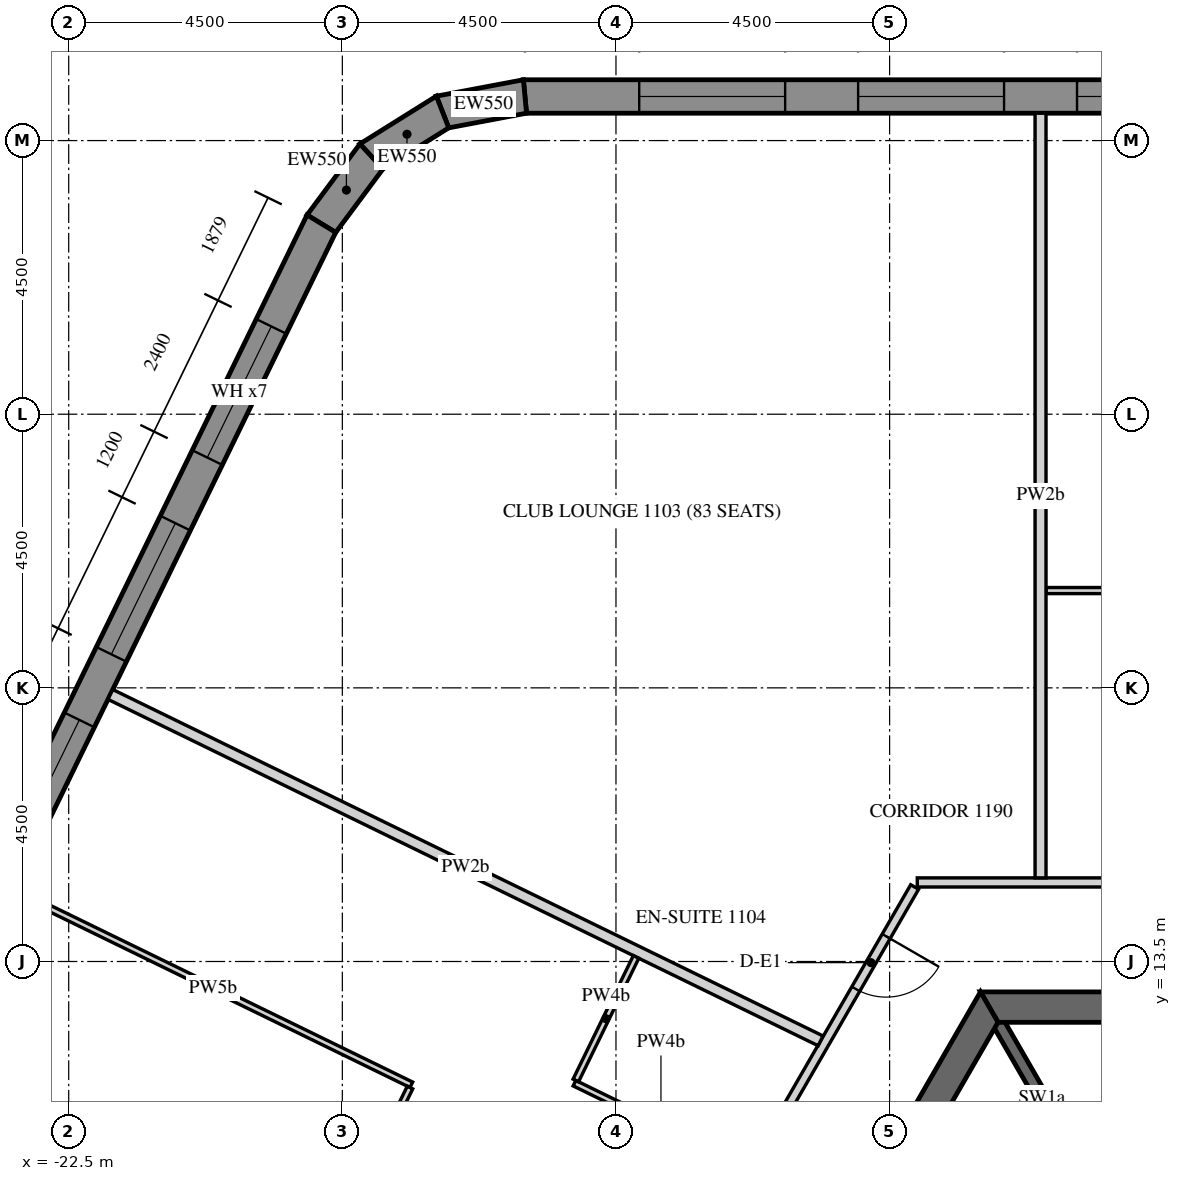
"""IFC4 building model, lengths in metres.
Left out: names, types, materials, properties, quantities, classifications, styles, units other than length and angle.
Written with IfcOpenShell. Run it as: python <this file> out.ifc"""

import sys

from ifc_helpers import new_model, si_unit, direction, frame, frame_2d, origin, place, context, subcontext, project, spatial, polyline, rectangle, outline, extrude, element, fill, save


model = new_model("IFC4")
c1 = context("Model", 3, precision=1e-05, world=origin(), true_north=direction((0.0, 1.0)))
c2 = subcontext(c1, "Body", "Model", "MODEL_VIEW")
j1 = project(units=[si_unit("LENGTHUNIT", "METRE"), si_unit("PLANEANGLEUNIT", "RADIAN")], contexts=[c1])
p1 = place(None, origin())
s1 = spatial("IfcSite", under=j1, at=p1, CompositionType="ELEMENT")
p2 = place(p1, origin())
s2 = spatial("IfcBuilding", under=s1, at=p2, CompositionType="ELEMENT")
p3 = place(p2, frame((0.0, 0.0, 156.6)))
s3 = spatial("IfcBuildingStorey", under=s2, at=p3, CompositionType="ELEMENT", Elevation=156.6)
p4 = place(p3, frame((12.761, 27.725, -0.15), z_axis=(0.0, 0.0, 1.0), x_axis=(-1.0, 0.0, 0.0)))
e1 = element("IfcWall", 1, at=p4, inside=s3, PredefinedType="SOLIDWALL", context=c2, shape_type="SweptSolid", body=[
    extrude(outline(polyline([(-0.022, -0.275), (27.783, -0.275), (27.732, 0.275), (0.022, 0.275), (-0.022, -0.275)])), origin(), (0.0, 0.0, 1.0), 3.9),
])
p5 = place(p4, frame((1.879, 0.0, 1.05)))
e2 = element("IfcOpeningElement", 2, at=p5, cuts=e1, PredefinedType="OPENING", context=c2, shape_type="SweptSolid", body=[
    extrude(rectangle(XDim=2.4, YDim=2.4, at=frame_2d((1.2, 1.2))), frame((0.0, 0.285, 0.0), z_axis=(0.0, -1.0, 0.0), x_axis=(1.0, 0.0, 0.0)), (0.0, 0.0, 1.0), 0.57),
])
p6 = place(p4, frame((5.479, 0.0, 1.05)))
e3 = element("IfcOpeningElement", 3, at=p6, cuts=e1, PredefinedType="OPENING", context=c2, shape_type="SweptSolid", body=[
    extrude(rectangle(XDim=2.4, YDim=2.4, at=frame_2d((1.2, 1.2))), frame((0.0, 0.285, 0.0), z_axis=(0.0, -1.0, 0.0), x_axis=(1.0, 0.0, 0.0)), (0.0, 0.0, 1.0), 0.57),
])
p7 = place(p4, frame((9.079, 0.0, 1.05)))
e4 = element("IfcOpeningElement", 4, at=p7, cuts=e1, PredefinedType="OPENING", context=c2, shape_type="SweptSolid", body=[
    extrude(rectangle(XDim=2.4, YDim=2.4, at=frame_2d((1.2, 1.2))), frame((0.0, 0.285, 0.0), z_axis=(0.0, -1.0, 0.0), x_axis=(1.0, 0.0, 0.0)), (0.0, 0.0, 1.0), 0.57),
])
p8 = place(p4, frame((12.679, 0.0, 1.05)))
e5 = element("IfcOpeningElement", 5, at=p8, cuts=e1, PredefinedType="OPENING", context=c2, shape_type="SweptSolid", body=[
    extrude(rectangle(XDim=2.4, YDim=2.4, at=frame_2d((1.2, 1.2))), frame((0.0, 0.285, 0.0), z_axis=(0.0, -1.0, 0.0), x_axis=(1.0, 0.0, 0.0)), (0.0, 0.0, 1.0), 0.57),
])
p9 = place(p4, frame((16.279, 0.0, 1.05)))
e6 = element("IfcOpeningElement", 6, at=p9, cuts=e1, PredefinedType="OPENING", context=c2, shape_type="SweptSolid", body=[
    extrude(rectangle(XDim=2.4, YDim=2.4, at=frame_2d((1.2, 1.2))), frame((0.0, 0.285, 0.0), z_axis=(0.0, -1.0, 0.0), x_axis=(1.0, 0.0, 0.0)), (0.0, 0.0, 1.0), 0.57),
])
p10 = place(p4, frame((19.879, 0.0, 1.05)))
e7 = element("IfcOpeningElement", 7, at=p10, cuts=e1, PredefinedType="OPENING", context=c2, shape_type="SweptSolid", body=[
    extrude(rectangle(XDim=2.4, YDim=2.4, at=frame_2d((1.2, 1.2))), frame((0.0, 0.285, 0.0), z_axis=(0.0, -1.0, 0.0), x_axis=(1.0, 0.0, 0.0)), (0.0, 0.0, 1.0), 0.57),
])
p11 = place(p4, frame((23.479, 0.0, 1.05)))
e8 = element("IfcOpeningElement", 8, at=p11, cuts=e1, PredefinedType="OPENING", context=c2, shape_type="SweptSolid", body=[
    extrude(rectangle(XDim=2.4, YDim=2.4, at=frame_2d((1.2, 1.2))), frame((0.0, 0.285, 0.0), z_axis=(0.0, -1.0, 0.0), x_axis=(1.0, 0.0, 0.0)), (0.0, 0.0, 1.0), 0.57),
])
p12 = place(p3, frame((-14.997, 27.725, -0.15), z_axis=(0.0, 0.0, 1.0), x_axis=(-0.982705443133, -0.185175624845, 0.0)))
e9 = element("IfcWall", 9, at=p12, inside=s3, PredefinedType="SOLIDWALL", context=c2, shape_type="SweptSolid", body=[
    extrude(outline(polyline([(-0.026, -0.275), (1.431, -0.275), (1.327, 0.275), (0.026, 0.275), (-0.026, -0.275)])), origin(), (0.0, 0.0, 1.0), 3.9),
])
p13 = place(p3, frame((-16.352, 27.47, -0.15), z_axis=(0.0, 0.0, 1.0), x_axis=(-0.848057977594, -0.5299034503, 0.0)))
e10 = element("IfcWall", 10, at=p13, inside=s3, PredefinedType="SOLIDWALL", context=c2, shape_type="SweptSolid", body=[
    extrude(outline(polyline([(-0.052, -0.275), (1.431, -0.275), (1.327, 0.275), (0.052, 0.275), (-0.052, -0.275)])), origin(), (0.0, 0.0, 1.0), 3.9),
])
p14 = place(p3, frame((-17.521, 26.739, -0.15), z_axis=(0.0, 0.0, 1.0), x_axis=(-0.597135295884, -0.802140535324, 0.0)))
e11 = element("IfcWall", 11, at=p14, inside=s3, PredefinedType="SOLIDWALL", context=c2, shape_type="SweptSolid", body=[
    extrude(outline(polyline([(-0.052, -0.275), (1.405, -0.275), (1.354, 0.275), (0.052, 0.275), (-0.052, -0.275)])), origin(), (0.0, 0.0, 1.0), 3.9),
])
p15 = place(p3, frame((-18.345, 25.633, -0.15), z_axis=(0.0, 0.0, 1.0), x_axis=(-0.43837181828, -0.898793718791, 0.0)))
e12 = element("IfcWall", 12, at=p15, inside=s3, PredefinedType="SOLIDWALL", context=c2, shape_type="SweptSolid", body=[
    extrude(outline(polyline([(-0.026, -0.275), (27.78, -0.275), (27.735, 0.275), (0.026, 0.275), (-0.026, -0.275)])), origin(), (0.0, 0.0, 1.0), 3.9),
])
p16 = place(p15, frame((1.879, 0.0, 1.05)))
e13 = element("IfcOpeningElement", 13, at=p16, cuts=e12, PredefinedType="OPENING", context=c2, shape_type="SweptSolid", body=[
    extrude(rectangle(XDim=2.4, YDim=2.4, at=frame_2d((1.2, 1.2))), frame((0.0, 0.285, 0.0), z_axis=(0.0, -1.0, 0.0), x_axis=(1.0, 0.0, 0.0)), (0.0, 0.0, 1.0), 0.57),
])
p17 = place(p15, frame((5.479, 0.0, 1.05)))
e14 = element("IfcOpeningElement", 14, at=p17, cuts=e12, PredefinedType="OPENING", context=c2, shape_type="SweptSolid", body=[
    extrude(rectangle(XDim=2.4, YDim=2.4, at=frame_2d((1.2, 1.2))), frame((0.0, 0.285, 0.0), z_axis=(0.0, -1.0, 0.0), x_axis=(1.0, 0.0, 0.0)), (0.0, 0.0, 1.0), 0.57),
])
p18 = place(p15, frame((9.079, 0.0, 1.05)))
e15 = element("IfcOpeningElement", 15, at=p18, cuts=e12, PredefinedType="OPENING", context=c2, shape_type="SweptSolid", body=[
    extrude(rectangle(XDim=2.4, YDim=2.4, at=frame_2d((1.2, 1.2))), frame((0.0, 0.285, 0.0), z_axis=(0.0, -1.0, 0.0), x_axis=(1.0, 0.0, 0.0)), (0.0, 0.0, 1.0), 0.57),
])
p19 = place(p15, frame((12.679, 0.0, 1.05)))
e16 = element("IfcOpeningElement", 16, at=p19, cuts=e12, PredefinedType="OPENING", context=c2, shape_type="SweptSolid", body=[
    extrude(rectangle(XDim=2.4, YDim=2.4, at=frame_2d((1.2, 1.2))), frame((0.0, 0.285, 0.0), z_axis=(0.0, -1.0, 0.0), x_axis=(1.0, 0.0, 0.0)), (0.0, 0.0, 1.0), 0.57),
])
p20 = place(p15, frame((16.279, 0.0, 1.05)))
e17 = element("IfcOpeningElement", 17, at=p20, cuts=e12, PredefinedType="OPENING", context=c2, shape_type="SweptSolid", body=[
    extrude(rectangle(XDim=2.4, YDim=2.4, at=frame_2d((1.2, 1.2))), frame((0.0, 0.285, 0.0), z_axis=(0.0, -1.0, 0.0), x_axis=(1.0, 0.0, 0.0)), (0.0, 0.0, 1.0), 0.57),
])
p21 = place(p15, frame((19.879, 0.0, 1.05)))
e18 = element("IfcOpeningElement", 18, at=p21, cuts=e12, PredefinedType="OPENING", context=c2, shape_type="SweptSolid", body=[
    extrude(rectangle(XDim=2.4, YDim=2.4, at=frame_2d((1.2, 1.2))), frame((0.0, 0.285, 0.0), z_axis=(0.0, -1.0, 0.0), x_axis=(1.0, 0.0, 0.0)), (0.0, 0.0, 1.0), 0.57),
])
p22 = place(p15, frame((23.479, 0.0, 1.05)))
e19 = element("IfcOpeningElement", 19, at=p22, cuts=e12, PredefinedType="OPENING", context=c2, shape_type="SweptSolid", body=[
    extrude(rectangle(XDim=2.4, YDim=2.4, at=frame_2d((1.2, 1.2))), frame((0.0, 0.285, 0.0), z_axis=(0.0, -1.0, 0.0), x_axis=(1.0, 0.0, 0.0)), (0.0, 0.0, 1.0), 0.57),
])
p23 = place(p3, frame((-7.361, 12.75, -0.15), z_axis=(0.0, 0.0, 1.0), x_axis=(-0.50000571537, -0.866022103989, 0.0)))
e20 = element("IfcWall", 20, at=p23, inside=s3, PredefinedType="SHEAR", context=c2, shape_type="SweptSolid", body=[
    extrude(outline(polyline([(-0.144, -0.25), (14.867, -0.25), (14.578, 0.25), (0.144, 0.25), (-0.144, -0.25)])), origin(), (0.0, 0.0, 1.0), 3.9),
])
p24 = place(p23, frame((6.49, 0.0, 0.15)))
e21 = element("IfcOpeningElement", 21, at=p24, cuts=e20, PredefinedType="OPENING", context=c2, shape_type="SweptSolid", body=[
    extrude(rectangle(XDim=1.8, YDim=2.4, at=frame_2d((0.9, 1.2))), frame((0.0, 0.26, 0.0), z_axis=(0.0, -1.0, 0.0), x_axis=(1.0, 0.0, 0.0)), (0.0, 0.0, 1.0), 0.52),
])
p25 = place(p3, frame((7.361, 12.75, -0.15), z_axis=(0.0, 0.0, 1.0), x_axis=(-1.0, 0.0, 0.0)))
e22 = element("IfcWall", 22, at=p25, inside=s3, PredefinedType="SHEAR", context=c2, shape_type="SweptSolid", body=[
    extrude(outline(polyline([(-0.144, -0.25), (14.866, -0.25), (14.578, 0.25), (0.144, 0.25), (-0.144, -0.25)])), origin(), (0.0, 0.0, 1.0), 3.9),
])
p26 = place(p25, frame((6.761, 0.0, 0.15)))
e23 = element("IfcOpeningElement", 23, at=p26, cuts=e22, PredefinedType="OPENING", context=c2, shape_type="SweptSolid", body=[
    extrude(rectangle(XDim=1.2, YDim=2.4, at=frame_2d((0.6, 1.2))), frame((0.0, 0.26, 0.0), z_axis=(0.0, -1.0, 0.0), x_axis=(1.0, 0.0, 0.0)), (0.0, 0.0, 1.0), 0.52),
])
p27 = place(p3, frame((-5.773, 10.0, -0.15), z_axis=(0.0, 0.0, 1.0), x_axis=(-0.499995765644, 0.866027848477, 0.0)))
e24 = element("IfcWall", 24, at=p27, inside=s3, PredefinedType="SHEAR", context=c2, shape_type="SweptSolid", body=[
    extrude(rectangle(XDim=2.887, YDim=0.2, at=frame_2d((1.443, 0.0))), origin(), (0.0, 0.0, 1.0), 3.9),
])
p28 = place(p3, frame((6.091, 14.8, 0.0), z_axis=(0.0, 0.0, 1.0), x_axis=(-1.0, 0.0, 0.0)))
e25 = element("IfcWall", 25, at=p28, inside=s3, PredefinedType="PARTITIONING", context=c2, shape_type="SweptSolid", body=[
    extrude(rectangle(XDim=14.636, YDim=0.15, at=frame_2d((7.318, 0.0))), origin(), (0.0, 0.0, 1.0), 2.823),
])
p29 = place(p28, frame((7.909, 0.0, 0.0)))
e26 = element("IfcOpeningElement", 26, at=p29, cuts=e25, PredefinedType="OPENING", context=c2, shape_type="SweptSolid", body=[
    extrude(rectangle(XDim=1.0, YDim=2.1, at=frame_2d((0.5, 1.05))), frame((0.0, 0.085, 0.0), z_axis=(0.0, -1.0, 0.0), x_axis=(1.0, 0.0, 0.0)), (0.0, 0.0, 1.0), 0.17),
])
p30 = place(p3, frame((-8.588, 14.725, 0.0), z_axis=(0.0, 0.0, 1.0), x_axis=(-0.499996322767, -0.866027526826, 0.0)))
e27 = element("IfcWall", 27, at=p30, inside=s3, PredefinedType="PARTITIONING", context=c2, shape_type="SweptSolid", body=[
    extrude(rectangle(XDim=14.636, YDim=0.15, at=frame_2d((7.318, 0.0))), origin(), (0.0, 0.0, 1.0), 2.823),
])
p31 = place(p30, frame((0.936, 0.0, 0.0)))
e28 = element("IfcOpeningElement", 28, at=p31, cuts=e27, PredefinedType="OPENING", context=c2, shape_type="SweptSolid", body=[
    extrude(rectangle(XDim=1.0, YDim=2.1, at=frame_2d((0.5, 1.05))), frame((0.0, 0.085, 0.0), z_axis=(0.0, -1.0, 0.0), x_axis=(1.0, 0.0, 0.0)), (0.0, 0.0, 1.0), 0.17),
])
p32 = place(p30, frame((9.495, 0.0, 0.0)))
e29 = element("IfcOpeningElement", 29, at=p32, cuts=e27, PredefinedType="OPENING", context=c2, shape_type="SweptSolid", body=[
    extrude(rectangle(XDim=1.0, YDim=2.1, at=frame_2d((0.5, 1.05))), frame((0.0, 0.085, 0.0), z_axis=(0.0, -1.0, 0.0), x_axis=(1.0, 0.0, 0.0)), (0.0, 0.0, 1.0), 0.17),
])
p33 = place(p3, frame((0.632, 19.6, 0.0), z_axis=(0.0, 0.0, 1.0), x_axis=(-1.0, 0.0, 0.0)))
e30 = element("IfcWall", 30, at=p33, inside=s3, PredefinedType="PARTITIONING", context=c2, shape_type="SweptSolid", body=[
    extrude(rectangle(XDim=7.06, YDim=0.1, at=frame_2d((3.53, 0.0))), origin(), (0.0, 0.0, 1.0), 2.823),
])
p34 = place(p33, frame((3.1, 0.0, 0.0)))
e31 = element("IfcOpeningElement", 31, at=p34, cuts=e30, PredefinedType="OPENING", context=c2, shape_type="SweptSolid", body=[
    extrude(rectangle(XDim=0.9, YDim=2.1, at=frame_2d((0.45, 1.05))), frame((0.0, 0.06, 0.0), z_axis=(0.0, -1.0, 0.0), x_axis=(1.0, 0.0, 0.0)), (0.0, 0.0, 1.0), 0.12),
])
p35 = place(p3, frame((-6.518, 27.45, 0.0), z_axis=(0.0, 0.0, 1.0), x_axis=(0.0, -1.0, 0.0)))
e32 = element("IfcWall", 32, at=p35, inside=s3, PredefinedType="PARTITIONING", context=c2, shape_type="SweptSolid", body=[
    extrude(rectangle(XDim=12.575, YDim=0.18, at=frame_2d((6.288, 0.0))), origin(), (0.0, 0.0, 1.0), 2.823),
])
p36 = place(p3, frame((-21.815, 17.892, 0.0), z_axis=(0.0, 0.0, 1.0), x_axis=(0.898798778742, -0.43836144371, 0.0)))
e33 = element("IfcWall", 33, at=p36, inside=s3, PredefinedType="PARTITIONING", context=c2, shape_type="SweptSolid", body=[
    extrude(rectangle(XDim=12.994, YDim=0.18, at=frame_2d((6.497, 0.0))), origin(), (0.0, 0.0, 1.0), 2.823),
])
p37 = place(p3, frame((-11.338, 10.112, 0.0), z_axis=(0.0, 0.0, 1.0), x_axis=(-0.898781792608, 0.438396269688, 0.0)))
e34 = element("IfcWall", 34, at=p37, inside=s3, PredefinedType="PARTITIONING", context=c2, shape_type="SweptSolid", body=[
    extrude(rectangle(XDim=3.164, YDim=0.1, at=frame_2d((1.582, 0.0))), origin(), (0.0, 0.0, 1.0), 2.823),
])
p38 = place(p37, frame((1.264, 0.0, 0.0)))
e35 = element("IfcOpeningElement", 35, at=p38, cuts=e34, PredefinedType="OPENING", context=c2, shape_type="SweptSolid", body=[
    extrude(rectangle(XDim=0.8, YDim=2.1, at=frame_2d((0.4, 1.05))), frame((0.0, 0.06, 0.0), z_axis=(0.0, -1.0, 0.0), x_axis=(1.0, 0.0, 0.0)), (0.0, 0.0, 1.0), 0.12),
])
p39 = place(p3, frame((-14.16, 11.544, 0.0), z_axis=(0.0, 0.0, 1.0), x_axis=(0.438376807268, 0.898791285477, 0.0)))
e36 = element("IfcWall", 36, at=p39, inside=s3, PredefinedType="PARTITIONING", context=c2, shape_type="SweptSolid", body=[
    extrude(rectangle(XDim=2.26, YDim=0.1, at=frame_2d((1.13, 0.0))), origin(), (0.0, 0.0, 1.0), 2.823),
])
p40 = place(p3, frame((-23.393, 14.656, 0.0), z_axis=(0.0, 0.0, 1.0), x_axis=(0.898794291179, -0.43837064471, 0.0)))
e37 = element("IfcWall", 37, at=p40, inside=s3, PredefinedType="PARTITIONING", context=c2, shape_type="SweptSolid", body=[
    extrude(rectangle(XDim=7.262, YDim=0.1, at=frame_2d((3.631, 0.0))), origin(), (0.0, 0.0, 1.0), 2.823),
])
p41 = place(p3, frame((-16.887, 11.427, 0.0), z_axis=(0.0, 0.0, 1.0), x_axis=(-0.438369721011, -0.898794741696, 0.0)))
e38 = element("IfcWall", 38, at=p41, inside=s3, PredefinedType="PARTITIONING", context=c2, shape_type="SweptSolid", body=[
    extrude(rectangle(XDim=10.35, YDim=0.1, at=frame_2d((5.175, 0.0))), origin(), (0.0, 0.0, 1.0), 2.823),
])
p42 = place(p41, frame((4.9, 0.0, 0.0)))
e39 = element("IfcOpeningElement", 39, at=p42, cuts=e38, PredefinedType="OPENING", context=c2, shape_type="SweptSolid", body=[
    extrude(rectangle(XDim=0.9, YDim=2.1, at=frame_2d((0.45, 1.05))), frame((0.0, 0.06, 0.0), z_axis=(0.0, -1.0, 0.0), x_axis=(1.0, 0.0, 0.0)), (0.0, 0.0, 1.0), 0.12),
])
p43 = place(p9, frame((0.0, 0.205, 0.0)))
e40 = element("IfcWindow", 40, at=p43, inside=s3, PartitioningType="DOUBLE_PANEL_VERTICAL", PredefinedType="WINDOW", context=c2, shape_type="SweptSolid", body=[
    extrude(rectangle(XDim=2.4, YDim=2.4, at=frame_2d((1.2, 1.2))), frame((0.0, 0.03, 0.0), z_axis=(0.0, -1.0, 0.0), x_axis=(1.0, 0.0, 0.0)), (0.0, 0.0, 1.0), 0.06),
])
fill(e6, e40)
p44 = place(p10, frame((0.0, 0.205, 0.0)))
e41 = element("IfcWindow", 41, at=p44, inside=s3, PartitioningType="DOUBLE_PANEL_VERTICAL", PredefinedType="WINDOW", context=c2, shape_type="SweptSolid", body=[
    extrude(rectangle(XDim=2.4, YDim=2.4, at=frame_2d((1.2, 1.2))), frame((0.0, 0.03, 0.0), z_axis=(0.0, -1.0, 0.0), x_axis=(1.0, 0.0, 0.0)), (0.0, 0.0, 1.0), 0.06),
])
fill(e7, e41)
p45 = place(p11, frame((0.0, 0.205, 0.0)))
e42 = element("IfcWindow", 42, at=p45, inside=s3, PartitioningType="DOUBLE_PANEL_VERTICAL", PredefinedType="WINDOW", context=c2, shape_type="SweptSolid", body=[
    extrude(rectangle(XDim=2.4, YDim=2.4, at=frame_2d((1.2, 1.2))), frame((0.0, 0.03, 0.0), z_axis=(0.0, -1.0, 0.0), x_axis=(1.0, 0.0, 0.0)), (0.0, 0.0, 1.0), 0.06),
])
fill(e8, e42)
p46 = place(p16, frame((0.0, 0.205, 0.0)))
e43 = element("IfcWindow", 43, at=p46, inside=s3, PartitioningType="DOUBLE_PANEL_VERTICAL", PredefinedType="WINDOW", context=c2, shape_type="SweptSolid", body=[
    extrude(rectangle(XDim=2.4, YDim=2.4, at=frame_2d((1.2, 1.2))), frame((0.0, 0.03, 0.0), z_axis=(0.0, -1.0, 0.0), x_axis=(1.0, 0.0, 0.0)), (0.0, 0.0, 1.0), 0.06),
])
fill(e13, e43)
p47 = place(p17, frame((0.0, 0.205, 0.0)))
e44 = element("IfcWindow", 44, at=p47, inside=s3, PartitioningType="DOUBLE_PANEL_VERTICAL", PredefinedType="WINDOW", context=c2, shape_type="SweptSolid", body=[
    extrude(rectangle(XDim=2.4, YDim=2.4, at=frame_2d((1.2, 1.2))), frame((0.0, 0.03, 0.0), z_axis=(0.0, -1.0, 0.0), x_axis=(1.0, 0.0, 0.0)), (0.0, 0.0, 1.0), 0.06),
])
fill(e14, e44)
p48 = place(p18, frame((0.0, 0.205, 0.0)))
e45 = element("IfcWindow", 45, at=p48, inside=s3, PartitioningType="DOUBLE_PANEL_VERTICAL", PredefinedType="WINDOW", context=c2, shape_type="SweptSolid", body=[
    extrude(rectangle(XDim=2.4, YDim=2.4, at=frame_2d((1.2, 1.2))), frame((0.0, 0.03, 0.0), z_axis=(0.0, -1.0, 0.0), x_axis=(1.0, 0.0, 0.0)), (0.0, 0.0, 1.0), 0.06),
])
fill(e15, e45)
p49 = place(p31, origin())
e46 = element("IfcDoor", 46, at=p49, inside=s3, OperationType="SINGLE_SWING_RIGHT", PredefinedType="DOOR", context=c2, shape_type="SweptSolid", body=[
    extrude(rectangle(XDim=1.0, YDim=2.1, at=frame_2d((0.5, 1.05))), frame((0.0, 0.025, 0.0), z_axis=(0.0, -1.0, 0.0), x_axis=(1.0, 0.0, 0.0)), (0.0, 0.0, 1.0), 0.05),
])
fill(e28, e46)
save(model, sys.argv[1])
